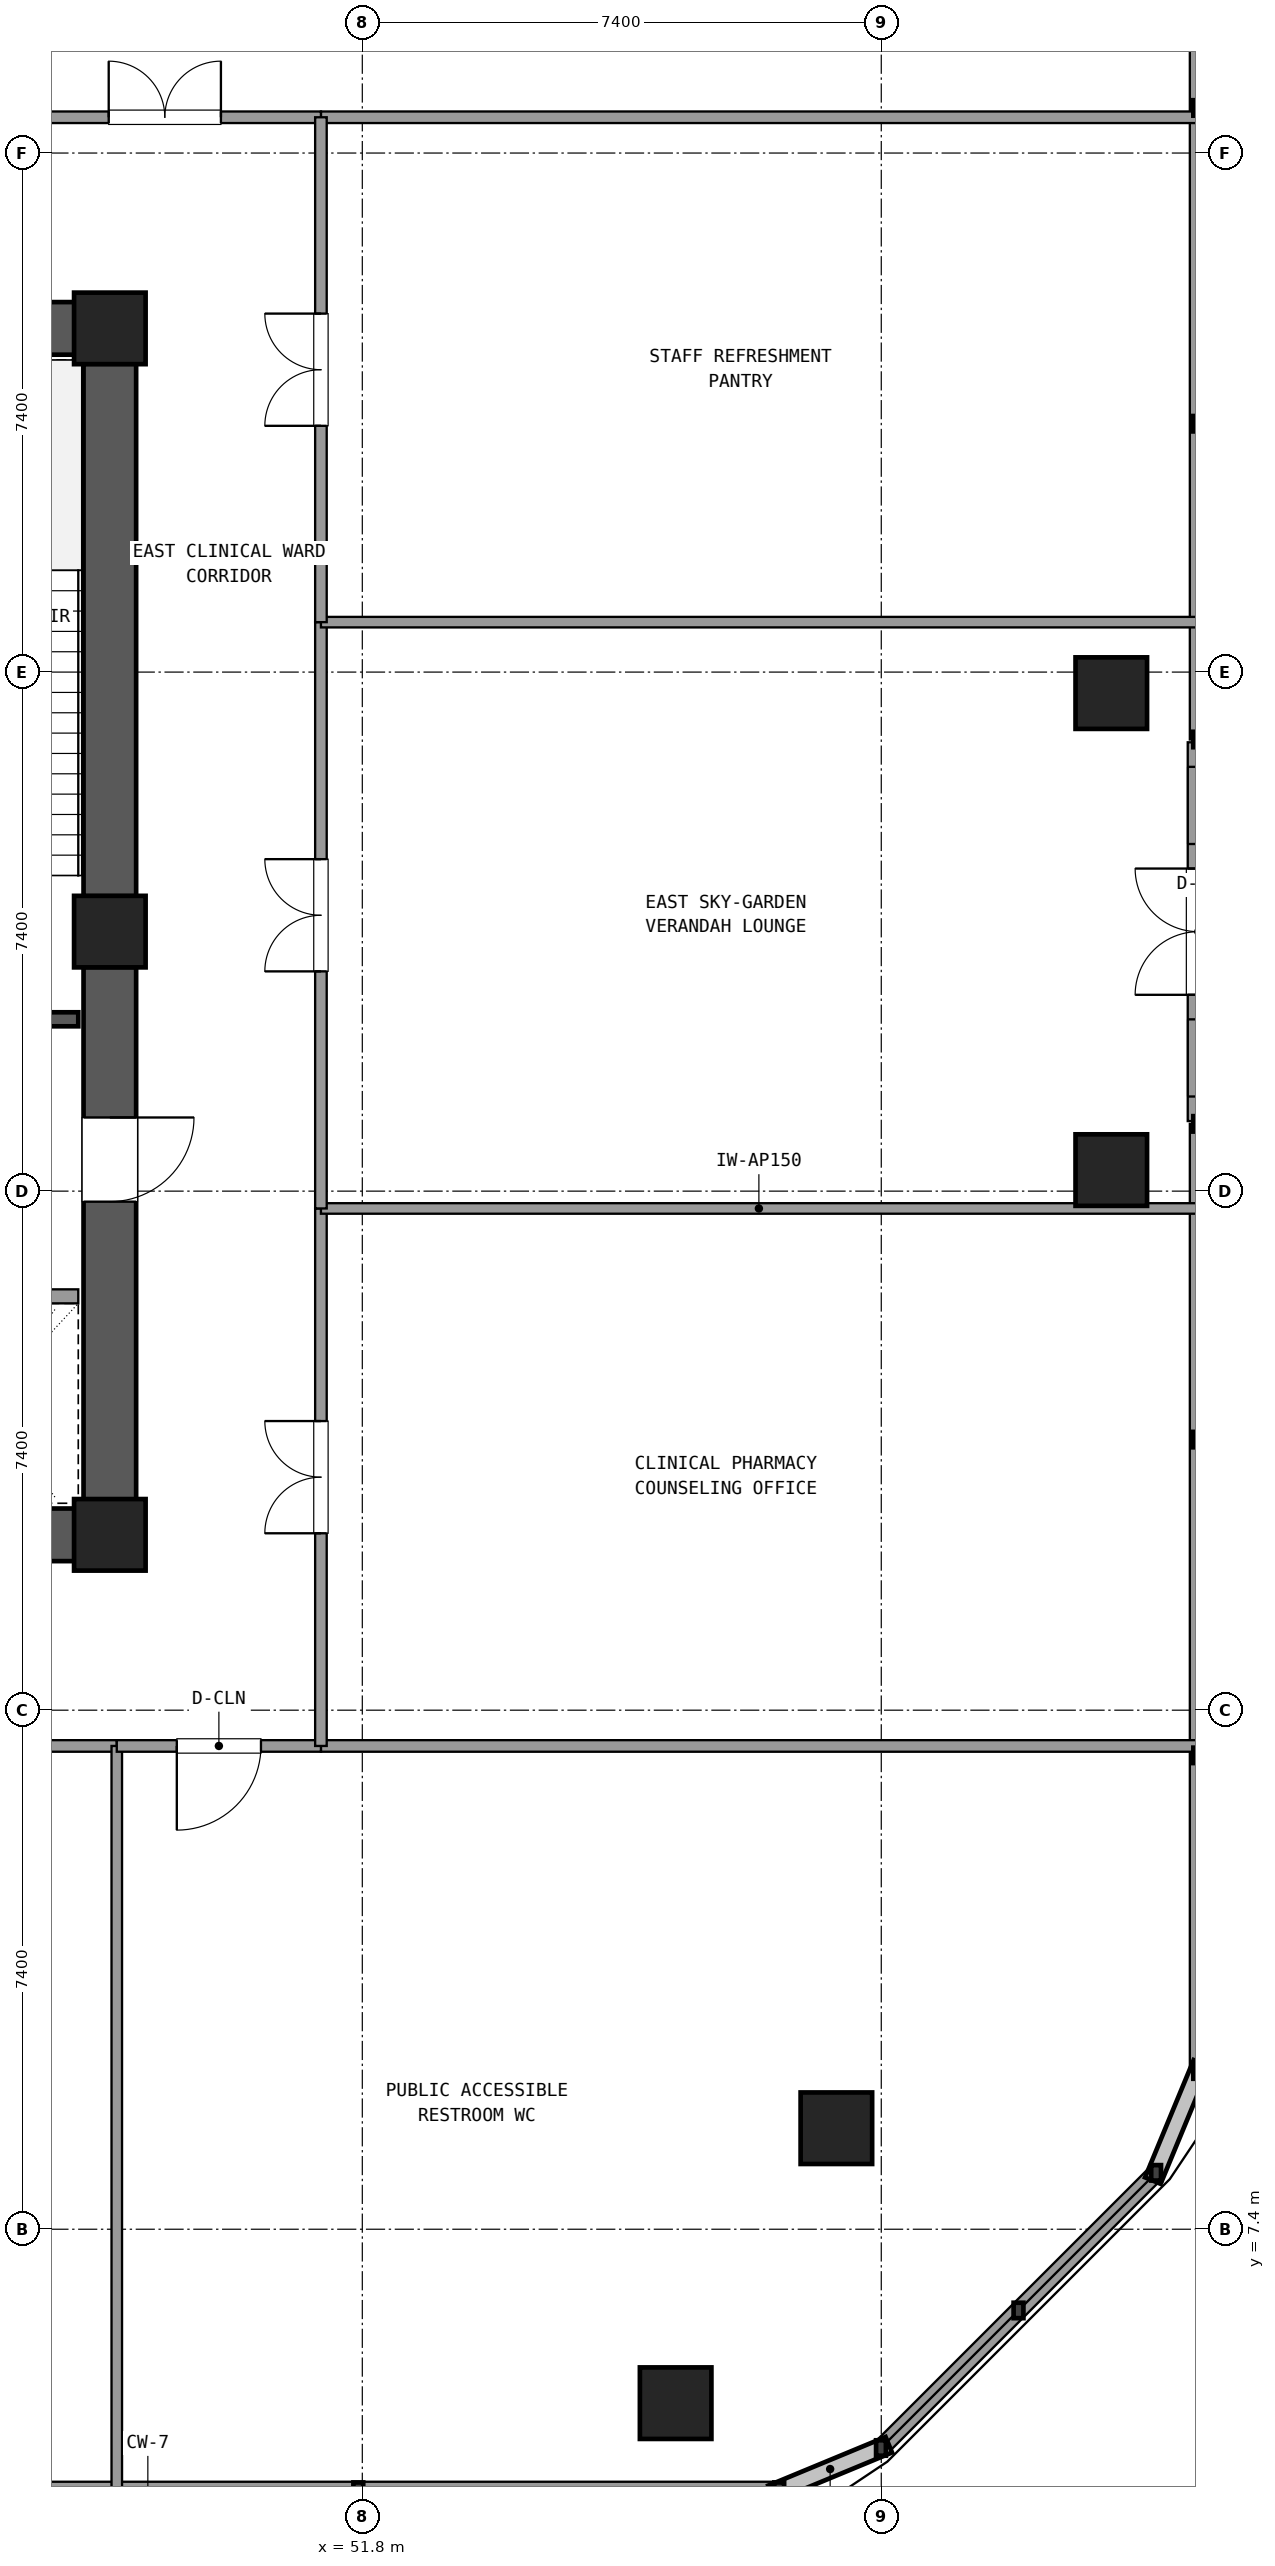
"""IFC4 building model, lengths in metres.
Left out: names, types, materials, properties, quantities, classifications, styles, units other than length and angle.
Written with IfcOpenShell. Run it as: python <this file> out.ifc"""

import sys

from ifc_helpers import new_model, si_unit, direction, frame, frame_2d, origin, origin_2d, place, context, subcontext, project, spatial, rectangle, extrude, element, fill, save


model = new_model("IFC4")
c1 = context("Model", 3, precision=1e-05, world=origin(), true_north=direction((0.0, 1.0)))
c2 = subcontext(c1, "Body", "Model", "MODEL_VIEW")
j1 = project(units=[si_unit("LENGTHUNIT", "METRE"), si_unit("PLANEANGLEUNIT", "RADIAN")], contexts=[c1])
p1 = place(None, origin())
s1 = spatial("IfcSite", under=j1, at=p1, CompositionType="ELEMENT")
p2 = place(p1, origin())
s2 = spatial("IfcBuilding", under=s1, at=p2, CompositionType="ELEMENT")
p3 = place(p2, frame((0.0, 0.0, 75.42)))
s3 = spatial("IfcBuildingStorey", under=s2, at=p3, CompositionType="ELEMENT", Elevation=75.42)
for number, where, z_axis, x_axis in (
    (1, (48.2, 17.3, 0.0), (0.0, 0.0, 1.0), (1.0, 0.0, 0.0)),
    (2, (48.2, 25.9, 0.0), (0.0, 0.0, 1.0), (1.0, 0.0, 0.0)),
    (3, (48.2, 34.5, 0.0), (0.0, 0.0, 1.0), (1.0, 0.0, 0.0)),
):
    element("IfcColumn", number, at=place(p3, frame(where, z_axis=z_axis, x_axis=x_axis)), inside=s3, PredefinedType="COLUMN", context=c2, shape_type="SweptSolid", body=[
        extrude(rectangle(XDim=1.02, YDim=1.02, at=origin_2d()), origin(), (0.0, 0.0, 1.0), 5.76),
    ])
p4 = place(p3, frame((37.505, 17.3, 0.0), z_axis=(0.0, 0.0, 1.0), x_axis=(1.0, 0.0, 0.0)))
e4 = element("IfcWall", 4, at=p4, inside=s3, PredefinedType="SHEAR", context=c2, shape_type="SweptSolid", body=[
    extrude(rectangle(XDim=10.19, YDim=0.75, at=frame_2d((5.095, 0.0))), origin(), (0.0, 0.0, 1.0), 5.48),
])
p5 = place(p3, frame((48.2, 17.805, 0.0), z_axis=(0.0, 0.0, 1.0), x_axis=(0.0, 1.0, 0.0)))
e5 = element("IfcWall", 5, at=p5, inside=s3, PredefinedType="SHEAR", context=c2, shape_type="SweptSolid", body=[
    extrude(rectangle(XDim=7.59, YDim=0.75, at=frame_2d((3.795, 0.0))), origin(), (0.0, 0.0, 1.0), 5.48),
])
p6 = place(p5, frame((4.245, 0.0, 0.0)))
e6 = element("IfcOpeningElement", 6, at=p6, cuts=e5, PredefinedType="OPENING", context=c2, shape_type="SweptSolid", body=[
    extrude(rectangle(XDim=1.2, YDim=2.15, at=frame_2d((0.6, 1.075))), frame((0.0, 0.385, 0.0), z_axis=(0.0, -1.0, 0.0), x_axis=(1.0, 0.0, 0.0)), (0.0, 0.0, 1.0), 0.77),
])
p7 = place(p3, frame((48.2, 26.405, 0.0), z_axis=(0.0, 0.0, 1.0), x_axis=(0.0, 1.0, 0.0)))
e7 = element("IfcWall", 7, at=p7, inside=s3, PredefinedType="SHEAR", context=c2, shape_type="SweptSolid", body=[
    extrude(rectangle(XDim=7.59, YDim=0.75, at=frame_2d((3.795, 0.0))), origin(), (0.0, 0.0, 1.0), 5.48),
])
p8 = place(p3, frame((47.695, 34.5, 0.0), z_axis=(0.0, 0.0, 1.0), x_axis=(-1.0, 0.0, 0.0)))
e8 = element("IfcWall", 8, at=p8, inside=s3, PredefinedType="SHEAR", context=c2, shape_type="SweptSolid", body=[
    extrude(rectangle(XDim=10.19, YDim=0.75, at=frame_2d((5.095, 0.0))), origin(), (0.0, 0.0, 1.0), 5.48),
])
p9 = place(p8, frame((4.595, 0.0, 0.0)))
e9 = element("IfcOpeningElement", 9, at=p9, cuts=e8, PredefinedType="OPENING", context=c2, shape_type="SweptSolid", body=[
    extrude(rectangle(XDim=1.6, YDim=2.2, at=frame_2d((0.8, 1.1))), frame((0.0, 0.385, 0.0), z_axis=(0.0, -1.0, 0.0), x_axis=(1.0, 0.0, 0.0)), (0.0, 0.0, 1.0), 0.77),
])
for number, where, z_axis, x_axis in (
    (10, (56.268, 4.92, 0.0), (0.0, 0.0, 1.0), (1.0, 0.0, 0.0)),
    (11, (58.56, 8.84, 0.0), (0.0, 0.0, 1.0), (1.0, 0.0, 0.0)),
    (12, (62.48, 22.5, 0.0), (0.0, 0.0, 1.0), (1.0, 0.0, 0.0)),
    (13, (62.48, 29.3, 0.0), (0.0, 0.0, 1.0), (1.0, 0.0, 0.0)),
):
    element("IfcColumn", number, at=place(p3, frame(where, z_axis=z_axis, x_axis=x_axis)), inside=s3, PredefinedType="COLUMN", context=c2, shape_type="SweptSolid", body=[
        extrude(rectangle(XDim=1.02, YDim=1.02, at=origin_2d()), origin(), (0.0, 0.0, 1.0), 5.76),
    ])
p10 = place(p3, frame((39.739, 3.68, 0.0), z_axis=(0.0, 0.0, 1.0), x_axis=(1.0, 0.0, 0.0)))
e14 = element("IfcWall", 14, at=p10, inside=s3, PredefinedType="SOLIDWALL", context=c2, shape_type="SweptSolid", body=[
    extrude(rectangle(XDim=18.006, YDim=0.24, at=frame_2d((9.003, 0.0))), origin(), (0.0, 0.0, 1.0), 0.85),
])
p11 = place(p3, frame((59.196, 4.281, 0.0), z_axis=(0.0, 0.0, 1.0), x_axis=(0.707084777957, 0.707128783731, 0.0)))
e15 = element("IfcWall", 15, at=p11, inside=s3, PredefinedType="SOLIDWALL", context=c2, shape_type="SweptSolid", body=[
    extrude(rectangle(XDim=5.548, YDim=0.24, at=frame_2d((2.774, 0.0))), origin(), (0.0, 0.0, 1.0), 0.85),
])
p12 = place(p3, frame((63.72, 23.199, 0.0), z_axis=(0.0, 0.0, 1.0), x_axis=(0.0, 1.0, 0.0)))
e16 = element("IfcWall", 16, at=p12, inside=s3, PredefinedType="SOLIDWALL", context=c2, shape_type="SweptSolid", body=[
    extrude(rectangle(XDim=5.4, YDim=0.3, at=frame_2d((2.7, 0.0))), origin(), (0.0, 0.0, 1.0), 4.83),
])
p13 = place(p12, frame((1.8, 0.0, 0.0)))
e17 = element("IfcOpeningElement", 17, at=p13, cuts=e16, PredefinedType="OPENING", context=c2, shape_type="SweptSolid", body=[
    extrude(rectangle(XDim=1.8, YDim=2.25, at=frame_2d((0.9, 1.125))), frame((0.0, 0.16, 0.0), z_axis=(0.0, -1.0, 0.0), x_axis=(1.0, 0.0, 0.0)), (0.0, 0.0, 1.0), 0.32),
])
p14 = place(p12, frame((0.35, 0.0, 0.4)))
e18 = element("IfcOpeningElement", 18, at=p14, cuts=e16, PredefinedType="OPENING", context=c2, shape_type="SweptSolid", body=[
    extrude(rectangle(XDim=1.1, YDim=1.8, at=frame_2d((0.55, 0.9))), frame((0.0, 0.16, 0.0), z_axis=(0.0, -1.0, 0.0), x_axis=(1.0, 0.0, 0.0)), (0.0, 0.0, 1.0), 0.32),
])
p15 = place(p12, frame((3.95, 0.0, 0.4)))
e19 = element("IfcOpeningElement", 19, at=p15, cuts=e16, PredefinedType="OPENING", context=c2, shape_type="SweptSolid", body=[
    extrude(rectangle(XDim=1.1, YDim=1.8, at=frame_2d((0.55, 0.9))), frame((0.0, 0.16, 0.0), z_axis=(0.0, -1.0, 0.0), x_axis=(1.0, 0.0, 0.0)), (0.0, 0.0, 1.0), 0.32),
])
p16 = place(p3, frame((63.72, 9.655, 0.0), z_axis=(0.0, 0.0, 1.0), x_axis=(0.0, 1.0, 0.0)))
e20 = element("IfcWall", 20, at=p16, inside=s3, PredefinedType="SOLIDWALL", context=c2, shape_type="SweptSolid", body=[
    extrude(rectangle(XDim=13.504, YDim=0.24, at=frame_2d((6.752, 0.0))), origin(), (0.0, 0.0, 1.0), 0.85),
])
p17 = place(p3, frame((63.72, 28.639, 0.0), z_axis=(0.0, 0.0, 1.0), x_axis=(0.0, 1.0, 0.0)))
e21 = element("IfcWall", 21, at=p17, inside=s3, PredefinedType="SOLIDWALL", context=c2, shape_type="SweptSolid", body=[
    extrude(rectangle(XDim=13.506, YDim=0.24, at=frame_2d((6.753, 0.0))), origin(), (0.0, 0.0, 1.0), 0.85),
])
p18 = place(p3, frame((43.35, 24.65, 0.0), z_axis=(0.0, 0.0, 1.0), x_axis=(1.0, 0.0, 0.0)))
e22 = element("IfcWall", 22, at=p18, inside=s3, PredefinedType="SHEAR", context=c2, shape_type="SweptSolid", body=[
    extrude(rectangle(XDim=4.4, YDim=0.2, at=frame_2d((2.2, 0.0))), origin(), (0.0, 0.0, 1.0), 5.48),
])
p19 = place(p18, frame((2.0, 0.0, 0.0)))
e23 = element("IfcOpeningElement", 23, at=p19, cuts=e22, PredefinedType="OPENING", context=c2, shape_type="SweptSolid", body=[
    extrude(rectangle(XDim=1.2, YDim=2.15, at=frame_2d((0.6, 1.075))), frame((0.0, 0.11, 0.0), z_axis=(0.0, -1.0, 0.0), x_axis=(1.0, 0.0, 0.0)), (0.0, 0.0, 1.0), 0.22),
])
p20 = place(p3, frame((43.35, 20.7, 0.0), z_axis=(0.0, 0.0, 1.0), x_axis=(1.0, 0.0, 0.0)))
e24 = element("IfcWall", 24, at=p20, inside=s3, PredefinedType="SOLIDWALL", context=c2, shape_type="SweptSolid", body=[
    extrude(rectangle(XDim=4.4, YDim=0.2, at=frame_2d((2.2, 0.0))), origin(), (0.0, 0.0, 1.0), 4.77),
])
p21 = place(p20, frame((2.35, 0.0, 0.0)))
e25 = element("IfcOpeningElement", 25, at=p21, cuts=e24, PredefinedType="OPENING", context=c2, shape_type="SweptSolid", body=[
    extrude(rectangle(XDim=1.2, YDim=2.15, at=frame_2d((0.6, 1.075))), frame((0.0, 0.11, 0.0), z_axis=(0.0, -1.0, 0.0), x_axis=(1.0, 0.0, 0.0)), (0.0, 0.0, 1.0), 0.22),
])
for number, where, z_axis, x_axis in (
    (26, (51.21, 37.51, 0.0), (0.0, 0.0, 1.0), (1.0, 0.0, 0.0)),
    (27, (51.21, 14.29, 0.0), (0.0, 0.0, 1.0), (1.0, 0.0, 0.0)),
):
    element("IfcWall", number, at=place(p3, frame(where, z_axis=z_axis, x_axis=x_axis)), inside=s3, PredefinedType="PARTITIONING", context=c2, shape_type="SweptSolid", body=[
        extrude(rectangle(XDim=12.49, YDim=0.165, at=frame_2d((6.245, 0.0))), origin(), (0.0, 0.0, 1.0), 4.77),
    ])
p22 = place(p3, frame((46.758, 37.51, 0.0), z_axis=(0.0, 0.0, 1.0), x_axis=(1.0, 0.0, 0.0)))
e28 = element("IfcWall", 28, at=p22, inside=s3, PredefinedType="PARTITIONING", context=c2, shape_type="SweptSolid", body=[
    extrude(rectangle(XDim=4.452, YDim=0.165, at=frame_2d((2.226, 0.0))), origin(), (0.0, 0.0, 1.0), 4.77),
])
p23 = place(p22, frame((1.426, 0.0, 0.0)))
e29 = element("IfcOpeningElement", 29, at=p23, cuts=e28, PredefinedType="OPENING", context=c2, shape_type="SweptSolid", body=[
    extrude(rectangle(XDim=1.6, YDim=2.2, at=frame_2d((0.8, 1.1))), frame((0.0, 0.093, 0.0), z_axis=(0.0, -1.0, 0.0), x_axis=(1.0, 0.0, 0.0)), (0.0, 0.0, 1.0), 0.185),
])
p24 = place(p3, frame((28.782, 14.29, 0.0), z_axis=(0.0, 0.0, 1.0), x_axis=(1.0, 0.0, 0.0)))
e30 = element("IfcWall", 30, at=p24, inside=s3, PredefinedType="PARTITIONING", context=c2, shape_type="SweptSolid", body=[
    extrude(rectangle(XDim=19.517, YDim=0.165, at=frame_2d((9.759, 0.0))), origin(), (0.0, 0.0, 1.0), 4.77),
])
p25 = place(p24, frame((8.958, 0.0, 0.0)))
e31 = element("IfcOpeningElement", 31, at=p25, cuts=e30, PredefinedType="OPENING", context=c2, shape_type="SweptSolid", body=[
    extrude(rectangle(XDim=1.6, YDim=2.2, at=frame_2d((0.8, 1.1))), frame((0.0, 0.093, 0.0), z_axis=(0.0, -1.0, 0.0), x_axis=(1.0, 0.0, 0.0)), (0.0, 0.0, 1.0), 0.185),
])
p26 = place(p3, frame((48.299, 14.29, 0.0), z_axis=(0.0, 0.0, 1.0), x_axis=(0.0, -1.0, 0.0)))
e32 = element("IfcWall", 32, at=p26, inside=s3, PredefinedType="PARTITIONING", context=c2, shape_type="SweptSolid", body=[
    extrude(rectangle(XDim=10.59, YDim=0.15, at=frame_2d((5.295, 0.0))), origin(), (0.0, 0.0, 1.0), 4.77),
])
p27 = place(p3, frame((48.299, 14.29, 0.0), z_axis=(0.0, 0.0, 1.0), x_axis=(1.0, 0.0, 0.0)))
e33 = element("IfcWall", 33, at=p27, inside=s3, PredefinedType="PARTITIONING", context=c2, shape_type="SweptSolid", body=[
    extrude(rectangle(XDim=2.911, YDim=0.165, at=frame_2d((1.456, 0.0))), origin(), (0.0, 0.0, 1.0), 4.77),
])
p28 = place(p27, frame((0.856, 0.0, 0.0)))
e34 = element("IfcOpeningElement", 34, at=p28, cuts=e33, PredefinedType="OPENING", context=c2, shape_type="SweptSolid", body=[
    extrude(rectangle(XDim=1.2, YDim=2.15, at=frame_2d((0.6, 1.075))), frame((0.0, 0.093, 0.0), z_axis=(0.0, -1.0, 0.0), x_axis=(1.0, 0.0, 0.0)), (0.0, 0.0, 1.0), 0.185),
])
p29 = place(p3, frame((51.21, 14.29, 0.0), z_axis=(0.0, 0.0, 1.0), x_axis=(0.0, 1.0, 0.0)))
e35 = element("IfcWall", 35, at=p29, inside=s3, PredefinedType="PARTITIONING", context=c2, shape_type="SweptSolid", body=[
    extrude(rectangle(XDim=7.663, YDim=0.165, at=frame_2d((3.832, 0.0))), origin(), (0.0, 0.0, 1.0), 4.77),
])
p30 = place(p29, frame((3.032, 0.0, 0.0)))
e36 = element("IfcOpeningElement", 36, at=p30, cuts=e35, PredefinedType="OPENING", context=c2, shape_type="SweptSolid", body=[
    extrude(rectangle(XDim=1.6, YDim=2.2, at=frame_2d((0.8, 1.1))), frame((0.0, 0.093, 0.0), z_axis=(0.0, -1.0, 0.0), x_axis=(1.0, 0.0, 0.0)), (0.0, 0.0, 1.0), 0.185),
])
p31 = place(p3, frame((51.21, 21.953, 0.0), z_axis=(0.0, 0.0, 1.0), x_axis=(1.0, 0.0, 0.0)))
e37 = element("IfcWall", 37, at=p31, inside=s3, PredefinedType="PARTITIONING", context=c2, shape_type="SweptSolid", body=[
    extrude(rectangle(XDim=12.49, YDim=0.15, at=frame_2d((6.245, 0.0))), origin(), (0.0, 0.0, 1.0), 4.77),
])
p32 = place(p3, frame((51.21, 21.953, 0.0), z_axis=(0.0, 0.0, 1.0), x_axis=(0.0, 1.0, 0.0)))
e38 = element("IfcWall", 38, at=p32, inside=s3, PredefinedType="PARTITIONING", context=c2, shape_type="SweptSolid", body=[
    extrude(rectangle(XDim=8.359, YDim=0.165, at=frame_2d((4.18, 0.0))), origin(), (0.0, 0.0, 1.0), 4.77),
])
p33 = place(p32, frame((3.38, 0.0, 0.0)))
e39 = element("IfcOpeningElement", 39, at=p33, cuts=e38, PredefinedType="OPENING", context=c2, shape_type="SweptSolid", body=[
    extrude(rectangle(XDim=1.6, YDim=2.2, at=frame_2d((0.8, 1.1))), frame((0.0, 0.093, 0.0), z_axis=(0.0, -1.0, 0.0), x_axis=(1.0, 0.0, 0.0)), (0.0, 0.0, 1.0), 0.185),
])
p34 = place(p3, frame((51.21, 30.312, 0.0), z_axis=(0.0, 0.0, 1.0), x_axis=(1.0, 0.0, 0.0)))
e40 = element("IfcWall", 40, at=p34, inside=s3, PredefinedType="PARTITIONING", context=c2, shape_type="SweptSolid", body=[
    extrude(rectangle(XDim=12.49, YDim=0.15, at=frame_2d((6.245, 0.0))), origin(), (0.0, 0.0, 1.0), 4.77),
])
p35 = place(p3, frame((51.21, 30.312, 0.0), z_axis=(0.0, 0.0, 1.0), x_axis=(0.0, 1.0, 0.0)))
e41 = element("IfcWall", 41, at=p35, inside=s3, PredefinedType="PARTITIONING", context=c2, shape_type="SweptSolid", body=[
    extrude(rectangle(XDim=7.198, YDim=0.165, at=frame_2d((3.599, 0.0))), origin(), (0.0, 0.0, 1.0), 4.77),
])
p36 = place(p35, frame((2.799, 0.0, 0.0)))
e42 = element("IfcOpeningElement", 42, at=p36, cuts=e41, PredefinedType="OPENING", context=c2, shape_type="SweptSolid", body=[
    extrude(rectangle(XDim=1.6, YDim=2.2, at=frame_2d((0.8, 1.1))), frame((0.0, 0.093, 0.0), z_axis=(0.0, -1.0, 0.0), x_axis=(1.0, 0.0, 0.0)), (0.0, 0.0, 1.0), 0.185),
])
p37 = place(p6, frame((1.2, 0.0, 0.0), z_axis=(0.0, 0.0, 1.0), x_axis=(-1.0, 0.0, 0.0)))
e43 = element("IfcDoor", 43, at=p37, inside=s3, OperationType="SINGLE_SWING_RIGHT", PredefinedType="DOOR", context=c2, shape_type="SweptSolid", body=[
    extrude(rectangle(XDim=1.2, YDim=2.15, at=frame_2d((0.6, 1.075))), frame((0.0, 0.025, 0.0), z_axis=(0.0, -1.0, 0.0), x_axis=(1.0, 0.0, 0.0)), (0.0, 0.0, 1.0), 0.05),
])
fill(e6, e43)
p38 = place(p23, origin())
e44 = element("IfcDoor", 44, at=p38, inside=s3, OperationType="DOUBLE_DOOR_SINGLE_SWING", PredefinedType="DOOR", context=c2, shape_type="SweptSolid", body=[
    extrude(rectangle(XDim=1.6, YDim=2.2, at=frame_2d((0.8, 1.1))), frame((0.0, 0.025, 0.0), z_axis=(0.0, -1.0, 0.0), x_axis=(1.0, 0.0, 0.0)), (0.0, 0.0, 1.0), 0.05),
])
fill(e29, e44)
p39 = place(p28, frame((1.2, 0.0, 0.0), z_axis=(0.0, 0.0, 1.0), x_axis=(-1.0, 0.0, 0.0)))
e45 = element("IfcDoor", 45, at=p39, inside=s3, OperationType="SINGLE_SWING_LEFT", PredefinedType="DOOR", context=c2, shape_type="SweptSolid", body=[
    extrude(rectangle(XDim=1.2, YDim=2.15, at=frame_2d((0.6, 1.075))), frame((0.0, 0.025, 0.0), z_axis=(0.0, -1.0, 0.0), x_axis=(1.0, 0.0, 0.0)), (0.0, 0.0, 1.0), 0.05),
])
fill(e34, e45)
p40 = place(p30, origin())
e46 = element("IfcDoor", 46, at=p40, inside=s3, OperationType="DOUBLE_DOOR_SINGLE_SWING", PredefinedType="DOOR", context=c2, shape_type="SweptSolid", body=[
    extrude(rectangle(XDim=1.6, YDim=2.2, at=frame_2d((0.8, 1.1))), frame((0.0, 0.025, 0.0), z_axis=(0.0, -1.0, 0.0), x_axis=(1.0, 0.0, 0.0)), (0.0, 0.0, 1.0), 0.05),
])
fill(e36, e46)
p41 = place(p33, origin())
e47 = element("IfcDoor", 47, at=p41, inside=s3, OperationType="DOUBLE_DOOR_SINGLE_SWING", PredefinedType="DOOR", context=c2, shape_type="SweptSolid", body=[
    extrude(rectangle(XDim=1.6, YDim=2.2, at=frame_2d((0.8, 1.1))), frame((0.0, 0.025, 0.0), z_axis=(0.0, -1.0, 0.0), x_axis=(1.0, 0.0, 0.0)), (0.0, 0.0, 1.0), 0.05),
])
fill(e39, e47)
p42 = place(p36, origin())
e48 = element("IfcDoor", 48, at=p42, inside=s3, OperationType="DOUBLE_DOOR_SINGLE_SWING", PredefinedType="DOOR", context=c2, shape_type="SweptSolid", body=[
    extrude(rectangle(XDim=1.6, YDim=2.2, at=frame_2d((0.8, 1.1))), frame((0.0, 0.025, 0.0), z_axis=(0.0, -1.0, 0.0), x_axis=(1.0, 0.0, 0.0)), (0.0, 0.0, 1.0), 0.05),
])
fill(e42, e48)
save(model, sys.argv[1])
